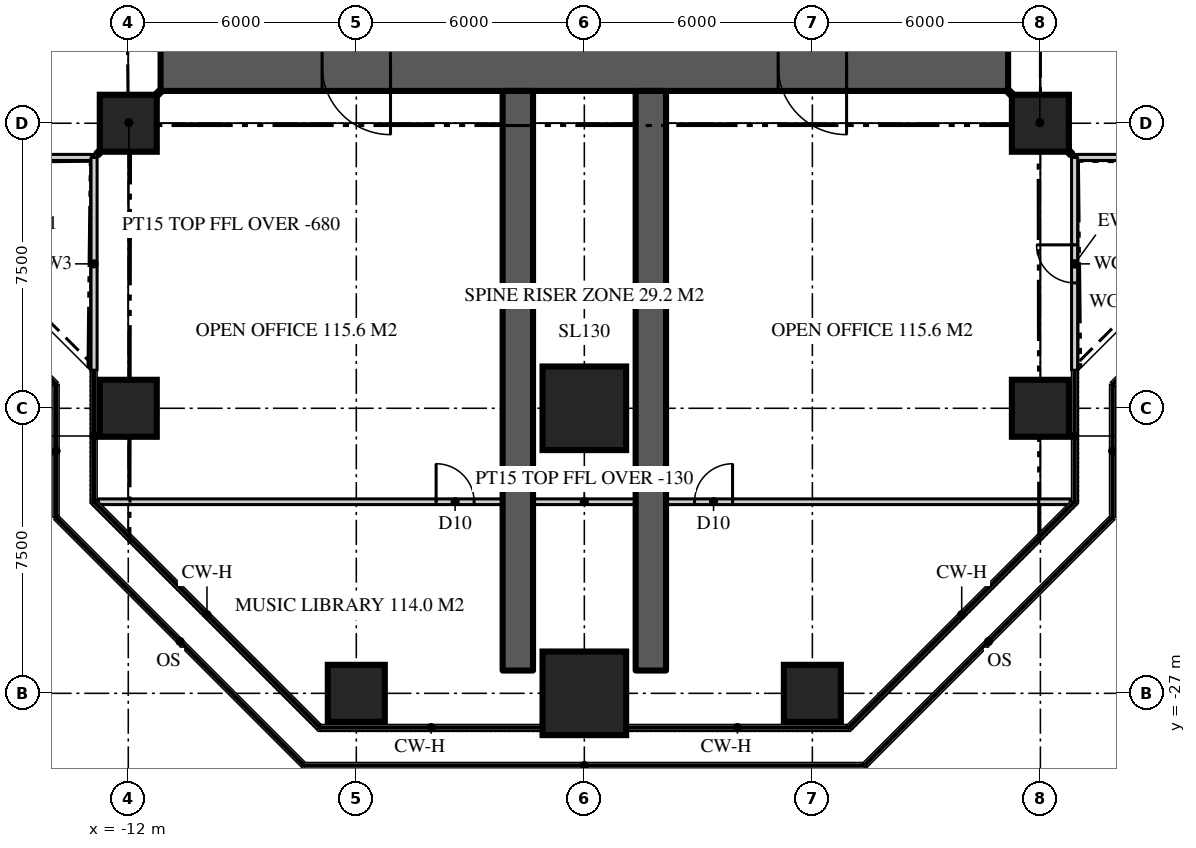
"""IFC4 building model, lengths in metres.
Left out: names, types, materials, properties, quantities, classifications, styles, units other than length and angle.
Written with IfcOpenShell. Run it as: python <this file> out.ifc"""

import sys

from ifc_helpers import new_model, si_unit, direction, frame, frame_2d, origin, origin_2d, place, context, subcontext, project, spatial, rectangle, extrude, element, fill, save


model = new_model("IFC4")
c1 = context("Model", 3, precision=1e-05, world=origin(), true_north=direction((0.0, 1.0)))
c2 = subcontext(c1, "Body", "Model", "MODEL_VIEW")
j1 = project(units=[si_unit("LENGTHUNIT", "METRE"), si_unit("PLANEANGLEUNIT", "RADIAN")], contexts=[c1])
p1 = place(None, origin())
s1 = spatial("IfcSite", under=j1, at=p1, CompositionType="ELEMENT")
p2 = place(p1, origin())
s2 = spatial("IfcBuilding", under=s1, at=p2, CompositionType="ELEMENT")
p3 = place(p2, frame((0.0, 0.0, 208.8)))
s3 = spatial("IfcBuildingStorey", under=s2, at=p3, CompositionType="ELEMENT", Elevation=208.8)
p4 = place(p3, frame((11.15, -10.5, 0.0), z_axis=(0.0, 0.0, 1.0), x_axis=(-1.0, 0.0, 0.0)))
e1 = element("IfcWall", 1, at=p4, inside=s3, PredefinedType="SHEAR", context=c2, shape_type="SweptSolid", body=[
    extrude(rectangle(XDim=22.3, YDim=1.3, at=frame_2d((11.15, 0.0))), origin(), (0.0, 0.0, 1.0), 3.9),
])
p5 = place(p4, frame((16.25, 0.0, 0.0)))
e2 = element("IfcOpeningElement", 2, at=p5, cuts=e1, PredefinedType="OPENING", context=c2, shape_type="SweptSolid", body=[
    extrude(rectangle(XDim=1.8, YDim=2.2, at=frame_2d((0.9, 1.1))), frame((0.0, 0.66, 0.0), z_axis=(0.0, -1.0, 0.0), x_axis=(1.0, 0.0, 0.0)), (0.0, 0.0, 1.0), 1.32),
])
p6 = place(p4, frame((4.25, 0.0, 0.0)))
e3 = element("IfcOpeningElement", 3, at=p6, cuts=e1, PredefinedType="OPENING", context=c2, shape_type="SweptSolid", body=[
    extrude(rectangle(XDim=1.8, YDim=2.2, at=frame_2d((0.9, 1.1))), frame((0.0, 0.66, 0.0), z_axis=(0.0, -1.0, 0.0), x_axis=(1.0, 0.0, 0.0)), (0.0, 0.0, 1.0), 1.32),
])
for number, where, z_axis, x_axis in (
    (4, (-1.75, -11.15, 0.0), (0.0, 0.0, 1.0), (0.0, -1.0, 0.0)),
    (5, (1.75, -11.15, 0.0), (0.0, 0.0, 1.0), (0.0, -1.0, 0.0)),
):
    element("IfcWall", number, at=place(p3, frame(where, z_axis=z_axis, x_axis=x_axis)), inside=s3, PredefinedType="SHEAR", context=c2, shape_type="SweptSolid", body=[
        extrude(rectangle(XDim=15.25, YDim=0.8, at=frame_2d((7.625, 0.0))), origin(), (0.0, 0.0, 1.0), 3.9),
    ])
p7 = place(p3, frame((-6.0, -27.0, 0.0), z_axis=(0.0, 0.0, 1.0), x_axis=(1.0, 0.0, 0.0)))
e6 = element("IfcColumn", 6, at=p7, inside=s3, PredefinedType="COLUMN", context=c2, shape_type="SweptSolid", body=[
    extrude(rectangle(XDim=1.5, YDim=1.5, at=origin_2d()), origin(), (0.0, 0.0, 1.0), 3.9),
])
p8 = place(p3, frame((0.0, -27.0, 0.0), z_axis=(0.0, 0.0, 1.0), x_axis=(1.0, 0.0, 0.0)))
e7 = element("IfcColumn", 7, at=p8, inside=s3, PredefinedType="COLUMN", context=c2, shape_type="SweptSolid", body=[
    extrude(rectangle(XDim=2.2, YDim=2.2, at=origin_2d()), origin(), (0.0, 0.0, 1.0), 3.9),
])
for number, where, z_axis, x_axis in (
    (8, (6.0, -27.0, 0.0), (0.0, 0.0, 1.0), (1.0, 0.0, 0.0)),
    (9, (-12.0, -19.5, 0.0), (0.0, 0.0, 1.0), (1.0, 0.0, 0.0)),
):
    element("IfcColumn", number, at=place(p3, frame(where, z_axis=z_axis, x_axis=x_axis)), inside=s3, PredefinedType="COLUMN", context=c2, shape_type="SweptSolid", body=[
        extrude(rectangle(XDim=1.5, YDim=1.5, at=origin_2d()), origin(), (0.0, 0.0, 1.0), 3.9),
    ])
p9 = place(p3, frame((0.0, -19.5, 0.0), z_axis=(0.0, 0.0, 1.0), x_axis=(1.0, 0.0, 0.0)))
e10 = element("IfcColumn", 10, at=p9, inside=s3, PredefinedType="COLUMN", context=c2, shape_type="SweptSolid", body=[
    extrude(rectangle(XDim=2.2, YDim=2.2, at=origin_2d()), origin(), (0.0, 0.0, 1.0), 3.9),
])
for number, where, z_axis, x_axis in (
    (11, (12.0, -19.5, 0.0), (0.0, 0.0, 1.0), (1.0, 0.0, 0.0)),
    (12, (-12.0, -12.0, 0.0), (0.0, 0.0, 1.0), (1.0, 0.0, 0.0)),
    (13, (12.0, -12.0, 0.0), (0.0, 0.0, 1.0), (1.0, 0.0, 0.0)),
):
    element("IfcColumn", number, at=place(p3, frame(where, z_axis=z_axis, x_axis=x_axis)), inside=s3, PredefinedType="COLUMN", context=c2, shape_type="SweptSolid", body=[
        extrude(rectangle(XDim=1.5, YDim=1.5, at=origin_2d()), origin(), (0.0, 0.0, 1.0), 3.9),
    ])
p10 = place(p3, frame((12.9, -12.9, 0.0), z_axis=(0.0, 0.0, 1.0), x_axis=(1.0, 0.0, 0.0)))
e14 = element("IfcWall", 14, at=p10, inside=s3, PredefinedType="SOLIDWALL", context=c2, shape_type="SweptSolid", body=[
    extrude(rectangle(XDim=5.6, YDim=0.16, at=frame_2d((2.8, 0.0))), origin(), (0.0, 0.0, 1.0), 3.77),
])
p11 = place(p3, frame((-18.5, -12.9, 0.0), z_axis=(0.0, 0.0, 1.0), x_axis=(1.0, 0.0, 0.0)))
e15 = element("IfcWall", 15, at=p11, inside=s3, PredefinedType="SOLIDWALL", context=c2, shape_type="SweptSolid", body=[
    extrude(rectangle(XDim=5.6, YDim=0.16, at=frame_2d((2.8, 0.0))), origin(), (0.0, 0.0, 1.0), 3.77),
])
p12 = place(p11, frame((2.3, 0.0, 0.0)))
e16 = element("IfcOpeningElement", 16, at=p12, cuts=e15, PredefinedType="OPENING", context=c2, shape_type="SweptSolid", body=[
    extrude(rectangle(XDim=1.0, YDim=2.2, at=frame_2d((0.5, 1.1))), frame((0.0, 0.09, 0.0), z_axis=(0.0, -1.0, 0.0), x_axis=(1.0, 0.0, 0.0)), (0.0, 0.0, 1.0), 0.18),
])
p13 = place(p3, frame((-12.9, -12.9, 0.0), z_axis=(0.0, 0.0, 1.0), x_axis=(0.0, -1.0, 0.0)))
e17 = element("IfcWall", 17, at=p13, inside=s3, PredefinedType="SOLIDWALL", context=c2, shape_type="SweptSolid", body=[
    extrude(rectangle(XDim=5.6, YDim=0.16, at=frame_2d((2.8, 0.0))), origin(), (0.0, 0.0, 1.0), 3.77),
])
p14 = place(p3, frame((12.9, -18.5, 0.0), z_axis=(0.0, 0.0, 1.0), x_axis=(0.0, 1.0, 0.0)))
e18 = element("IfcWall", 18, at=p14, inside=s3, PredefinedType="SOLIDWALL", context=c2, shape_type="SweptSolid", body=[
    extrude(rectangle(XDim=5.6, YDim=0.16, at=frame_2d((2.8, 0.0))), origin(), (0.0, 0.0, 1.0), 3.77),
])
p15 = place(p14, frame((2.3, 0.0, 0.0)))
e19 = element("IfcOpeningElement", 19, at=p15, cuts=e18, PredefinedType="OPENING", context=c2, shape_type="SweptSolid", body=[
    extrude(rectangle(XDim=1.0, YDim=2.2, at=frame_2d((0.5, 1.1))), frame((0.0, 0.09, 0.0), z_axis=(0.0, -1.0, 0.0), x_axis=(1.0, 0.0, 0.0)), (0.0, 0.0, 1.0), 0.18),
])
p16 = place(p3, frame((-12.786, -21.959, 0.0), z_axis=(0.0, 0.0, 1.0), x_axis=(1.0, 0.0, 0.0)))
e20 = element("IfcWall", 20, at=p16, inside=s3, PredefinedType="PARTITIONING", context=c2, shape_type="SweptSolid", body=[
    extrude(rectangle(XDim=25.573, YDim=0.15, at=frame_2d((12.786, 0.0))), origin(), (0.0, 0.0, 1.0), 3.77),
])
p17 = place(p16, frame((15.687, 0.0, 0.0)))
e21 = element("IfcOpeningElement", 21, at=p17, cuts=e20, PredefinedType="OPENING", context=c2, shape_type="SweptSolid", body=[
    extrude(rectangle(XDim=1.0, YDim=2.2, at=frame_2d((0.5, 1.1))), frame((0.0, 0.085, 0.0), z_axis=(0.0, -1.0, 0.0), x_axis=(1.0, 0.0, 0.0)), (0.0, 0.0, 1.0), 0.17),
])
p18 = place(p16, frame((8.886, 0.0, 0.0)))
e22 = element("IfcOpeningElement", 22, at=p18, cuts=e20, PredefinedType="OPENING", context=c2, shape_type="SweptSolid", body=[
    extrude(rectangle(XDim=1.0, YDim=2.2, at=frame_2d((0.5, 1.1))), frame((0.0, 0.085, 0.0), z_axis=(0.0, -1.0, 0.0), x_axis=(1.0, 0.0, 0.0)), (0.0, 0.0, 1.0), 0.17),
])
for number, where, z_axis, x_axis in (
    (23, (-11.15, -11.15, 0.0), (0.0, 0.0, 1.0), (-0.707, -0.707, 0.0)),
    (24, (11.15, -11.15, 0.0), (0.0, 0.0, 1.0), (0.707, -0.707, 0.0)),
):
    element("IfcWall", number, at=place(p3, frame(where, z_axis=z_axis, x_axis=x_axis)), inside=s3, PredefinedType="PARTITIONING", context=c2, shape_type="SweptSolid", body=[
        extrude(rectangle(XDim=2.362, YDim=0.15, at=frame_2d((1.181, 0.0))), origin(), (0.0, 0.0, 1.0), 3.22),
    ])
p19 = place(p15, origin())
e25 = element("IfcDoor", 25, at=p19, inside=s3, OperationType="SINGLE_SWING_RIGHT", PredefinedType="DOOR", context=c2, shape_type="SweptSolid", body=[
    extrude(rectangle(XDim=1.0, YDim=2.2, at=frame_2d((0.5, 1.1))), frame((0.0, 0.025, 0.0), z_axis=(0.0, -1.0, 0.0), x_axis=(1.0, 0.0, 0.0)), (0.0, 0.0, 1.0), 0.05),
])
fill(e19, e25)
p20 = place(p5, origin())
e26 = element("IfcDoor", 26, at=p20, inside=s3, OperationType="DOUBLE_DOOR_DOUBLE_SWING", PredefinedType="DOOR", context=c2, shape_type="SweptSolid", body=[
    extrude(rectangle(XDim=1.8, YDim=2.2, at=frame_2d((0.9, 1.1))), frame((0.0, 0.025, 0.0), z_axis=(0.0, -1.0, 0.0), x_axis=(1.0, 0.0, 0.0)), (0.0, 0.0, 1.0), 0.05),
])
fill(e2, e26)
p21 = place(p6, origin())
e27 = element("IfcDoor", 27, at=p21, inside=s3, OperationType="DOUBLE_DOOR_DOUBLE_SWING", PredefinedType="DOOR", context=c2, shape_type="SweptSolid", body=[
    extrude(rectangle(XDim=1.8, YDim=2.2, at=frame_2d((0.9, 1.1))), frame((0.0, 0.025, 0.0), z_axis=(0.0, -1.0, 0.0), x_axis=(1.0, 0.0, 0.0)), (0.0, 0.0, 1.0), 0.05),
])
fill(e3, e27)
p22 = place(p17, origin())
e28 = element("IfcDoor", 28, at=p22, inside=s3, OperationType="SINGLE_SWING_RIGHT", PredefinedType="DOOR", context=c2, shape_type="SweptSolid", body=[
    extrude(rectangle(XDim=1.0, YDim=2.2, at=frame_2d((0.5, 1.1))), frame((0.0, 0.025, 0.0), z_axis=(0.0, -1.0, 0.0), x_axis=(1.0, 0.0, 0.0)), (0.0, 0.0, 1.0), 0.05),
])
fill(e21, e28)
p23 = place(p18, origin())
e29 = element("IfcDoor", 29, at=p23, inside=s3, OperationType="SINGLE_SWING_LEFT", PredefinedType="DOOR", context=c2, shape_type="SweptSolid", body=[
    extrude(rectangle(XDim=1.0, YDim=2.2, at=frame_2d((0.5, 1.1))), frame((0.0, 0.025, 0.0), z_axis=(0.0, -1.0, 0.0), x_axis=(1.0, 0.0, 0.0)), (0.0, 0.0, 1.0), 0.05),
])
fill(e22, e29)
save(model, sys.argv[1])
